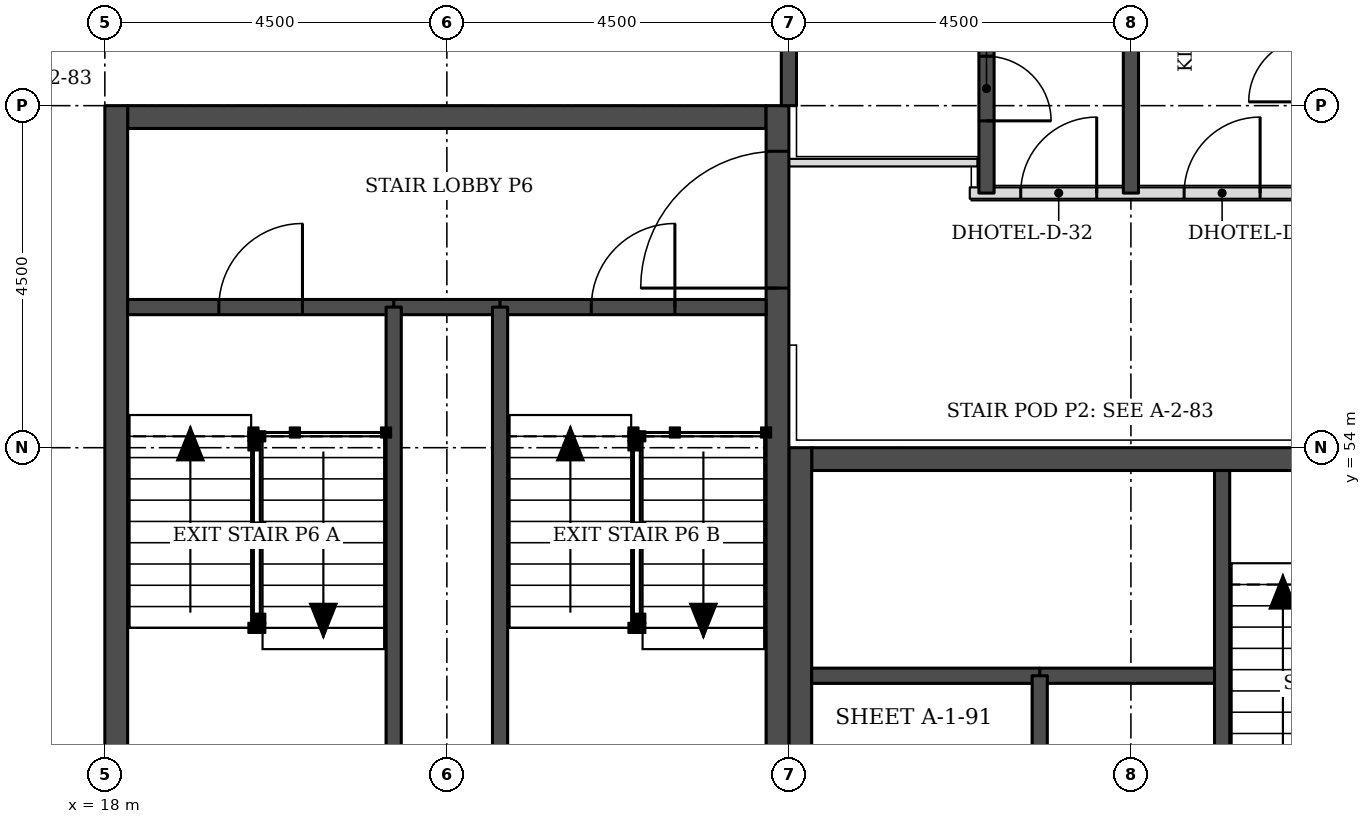
"""IFC4 building model, lengths in metres.
Left out: names, types, materials, properties, quantities, classifications, styles, units other than length and angle.
Written with IfcOpenShell. Run it as: python <this file> out.ifc"""

import sys

from ifc_helpers import new_model, si_unit, direction, frame, frame_2d, origin, place, context, subcontext, project, spatial, rectangle, extrude, element, fill, save


model = new_model("IFC4")
c1 = context("Model", 3, precision=1e-05, world=origin(), true_north=direction((0.0, 1.0)))
c2 = subcontext(c1, "Body", "Model", "MODEL_VIEW")
j1 = project(units=[si_unit("LENGTHUNIT", "METRE"), si_unit("PLANEANGLEUNIT", "RADIAN")], contexts=[c1])
p1 = place(None, origin())
s1 = spatial("IfcSite", under=j1, at=p1, CompositionType="ELEMENT")
p2 = place(p1, origin())
s2 = spatial("IfcBuilding", under=s1, at=p2, CompositionType="ELEMENT")
p3 = place(p2, frame((0.0, 0.0, 59.4)))
s3 = spatial("IfcBuildingStorey", under=s2, at=p3, CompositionType="ELEMENT", Elevation=59.4)
p4 = place(p3, frame((27.3, 53.85, 0.0), z_axis=(0.0, 0.0, 1.0), x_axis=(1.0, 0.0, 0.0)))
e1 = element("IfcWall", 1, at=p4, inside=s3, PredefinedType="SHEAR", context=c2, shape_type="SweptSolid", body=[
    extrude(rectangle(XDim=8.4, YDim=0.3, at=frame_2d((4.2, 0.0))), origin(), (0.0, 0.0, 1.0), 3.3),
])
p5 = place(p4, frame((6.4, 0.0, 0.0)))
e2 = element("IfcOpeningElement", 2, at=p5, cuts=e1, PredefinedType="OPENING", context=c2, shape_type="SweptSolid", body=[
    extrude(rectangle(XDim=1.1, YDim=2.1, at=frame_2d((0.55, 1.05))), frame((0.0, 0.16, 0.0), z_axis=(0.0, -1.0, 0.0), x_axis=(1.0, 0.0, 0.0)), (0.0, 0.0, 1.0), 0.32),
])
p6 = place(p3, frame((27.15, 45.0, 0.0), z_axis=(0.0, 0.0, 1.0), x_axis=(0.0, 1.0, 0.0)))
e3 = element("IfcWall", 3, at=p6, inside=s3, PredefinedType="SHEAR", context=c2, shape_type="SweptSolid", body=[
    extrude(rectangle(XDim=9.0, YDim=0.3, at=frame_2d((4.5, 0.0))), origin(), (0.0, 0.0, 1.0), 3.3),
])
p7 = place(p6, frame((0.4, 0.0, 0.0)))
e4 = element("IfcOpeningElement", 4, at=p7, cuts=e3, PredefinedType="OPENING", context=c2, shape_type="SweptSolid", body=[
    extrude(rectangle(XDim=1.1, YDim=2.1, at=frame_2d((0.55, 1.05))), frame((0.0, 0.16, 0.0), z_axis=(0.0, -1.0, 0.0), x_axis=(1.0, 0.0, 0.0)), (0.0, 0.0, 1.0), 0.32),
])
p8 = place(p3, frame((18.3, 58.35, 0.0), z_axis=(0.0, 0.0, 1.0), x_axis=(1.0, 0.0, 0.0)))
e5 = element("IfcWall", 5, at=p8, inside=s3, PredefinedType="SHEAR", context=c2, shape_type="SweptSolid", body=[
    extrude(rectangle(XDim=8.4, YDim=0.3, at=frame_2d((4.2, 0.0))), origin(), (0.0, 0.0, 1.0), 3.3),
])
p9 = place(p3, frame((18.15, 49.5, 0.0), z_axis=(0.0, 0.0, 1.0), x_axis=(0.0, 1.0, 0.0)))
e6 = element("IfcWall", 6, at=p9, inside=s3, PredefinedType="SHEAR", context=c2, shape_type="SweptSolid", body=[
    extrude(rectangle(XDim=9.0, YDim=0.3, at=frame_2d((4.5, 0.0))), origin(), (0.0, 0.0, 1.0), 3.3),
])
p10 = place(p3, frame((26.85, 49.5, 0.0), z_axis=(0.0, 0.0, 1.0), x_axis=(0.0, 1.0, 0.0)))
e7 = element("IfcWall", 7, at=p10, inside=s3, PredefinedType="SHEAR", context=c2, shape_type="SweptSolid", body=[
    extrude(rectangle(XDim=9.0, YDim=0.3, at=frame_2d((4.5, 0.0))), origin(), (0.0, 0.0, 1.0), 3.3),
])
p11 = place(p10, frame((6.6, 0.0, 0.0)))
e8 = element("IfcOpeningElement", 8, at=p11, cuts=e7, PredefinedType="OPENING", context=c2, shape_type="SweptSolid", body=[
    extrude(rectangle(XDim=1.8, YDim=2.1, at=frame_2d((0.9, 1.05))), frame((0.0, 0.16, 0.0), z_axis=(0.0, -1.0, 0.0), x_axis=(1.0, 0.0, 0.0)), (0.0, 0.0, 1.0), 0.32),
])
p12 = place(p3, frame((17.73, 63.826, 0.0), z_axis=(0.0, 0.0, 1.0), x_axis=(-0.707106781187, -0.707106781187, 0.0)))
e9 = element("IfcWall", 9, at=p12, inside=s3, PredefinedType="STANDARD", context=c2, shape_type="SweptSolid", body=[
    extrude(rectangle(XDim=7.151, YDim=0.35, at=frame_2d((3.576, 0.0))), origin(), (0.0, 0.0, 1.0), 3.055),
])
p13 = place(p12, frame((1.926, 0.0, 0.8)))
e10 = element("IfcOpeningElement", 10, at=p13, cuts=e9, PredefinedType="OPENING", context=c2, shape_type="SweptSolid", body=[
    extrude(rectangle(XDim=3.3, YDim=1.5, at=frame_2d((1.65, 0.75))), frame((0.0, 0.185, 0.0), z_axis=(0.0, -1.0, 0.0), x_axis=(1.0, 0.0, 0.0)), (0.0, 0.0, 1.0), 0.37),
])
p14 = place(p3, frame((29.38, 57.35, 0.0), z_axis=(0.0, 0.0, 1.0), x_axis=(1.0, 0.0, 0.0)))
e11 = element("IfcWall", 11, at=p14, inside=s3, PredefinedType="PARTITIONING", context=c2, shape_type="SweptSolid", body=[
    extrude(rectangle(XDim=13.62, YDim=0.15, at=frame_2d((6.81, 0.0))), origin(), (0.0, 0.0, 1.0), 3.08),
])
p15 = place(p14, frame((2.82, 0.0, 0.0)))
e12 = element("IfcOpeningElement", 12, at=p15, cuts=e11, PredefinedType="OPENING", context=c2, shape_type="SweptSolid", body=[
    extrude(rectangle(XDim=1.0, YDim=2.1, at=frame_2d((0.5, 1.05))), frame((0.0, 0.085, 0.0), z_axis=(0.0, -1.0, 0.0), x_axis=(1.0, 0.0, 0.0)), (0.0, 0.0, 1.0), 0.17),
])
p16 = place(p14, frame((0.67, 0.0, 0.0)))
e13 = element("IfcOpeningElement", 13, at=p16, cuts=e11, PredefinedType="OPENING", context=c2, shape_type="SweptSolid", body=[
    extrude(rectangle(XDim=1.0, YDim=2.1, at=frame_2d((0.5, 1.05))), frame((0.0, 0.085, 0.0), z_axis=(0.0, -1.0, 0.0), x_axis=(1.0, 0.0, 0.0)), (0.0, 0.0, 1.0), 0.17),
])
p17 = place(p14, frame((9.67, 0.0, 0.0)))
e14 = element("IfcOpeningElement", 14, at=p17, cuts=e11, PredefinedType="OPENING", context=c2, shape_type="SweptSolid", body=[
    extrude(rectangle(XDim=0.9, YDim=2.1, at=frame_2d((0.45, 1.05))), frame((0.0, 0.085, 0.0), z_axis=(0.0, -1.0, 0.0), x_axis=(1.0, 0.0, 0.0)), (0.0, 0.0, 1.0), 0.17),
])
p18 = place(p3, frame((27.0, 58.5, 0.0), z_axis=(0.0, 0.0, 1.0), x_axis=(0.0, 1.0, 0.0)))
e15 = element("IfcWall", 15, at=p18, inside=s3, PredefinedType="SOLIDWALL", context=c2, shape_type="SweptSolid", body=[
    extrude(rectangle(XDim=3.9, YDim=0.2, at=frame_2d((1.95, 0.0))), origin(), (0.0, 0.0, 1.0), 3.08),
])
p19 = place(p3, frame((29.6, 57.35, 0.0), z_axis=(0.0, 0.0, 1.0), x_axis=(0.0, 1.0, 0.0)))
e16 = element("IfcWall", 16, at=p19, inside=s3, PredefinedType="SOLIDWALL", context=c2, shape_type="SweptSolid", body=[
    extrude(rectangle(XDim=2.75, YDim=0.2, at=frame_2d((1.375, 0.0))), origin(), (0.0, 0.0, 1.0), 3.08),
])
p20 = place(p19, frame((0.95, 0.0, 0.0)))
e17 = element("IfcOpeningElement", 17, at=p20, cuts=e16, PredefinedType="OPENING", context=c2, shape_type="SweptSolid", body=[
    extrude(rectangle(XDim=0.85, YDim=2.1, at=frame_2d((0.425, 1.05))), frame((0.0, 0.11, 0.0), z_axis=(0.0, -1.0, 0.0), x_axis=(1.0, 0.0, 0.0)), (0.0, 0.0, 1.0), 0.22),
])
p21 = place(p3, frame((31.5, 57.35, 0.0), z_axis=(0.0, 0.0, 1.0), x_axis=(0.0, 1.0, 0.0)))
e18 = element("IfcWall", 18, at=p21, inside=s3, PredefinedType="SOLIDWALL", context=c2, shape_type="SweptSolid", body=[
    extrude(rectangle(XDim=5.05, YDim=0.2, at=frame_2d((2.525, 0.0))), origin(), (0.0, 0.0, 1.0), 3.08),
])
p22 = place(p3, frame((27.0, 57.75, 0.0), z_axis=(0.0, 0.0, 1.0), x_axis=(1.0, 0.0, 0.0)))
e19 = element("IfcWall", 19, at=p22, inside=s3, PredefinedType="PARTITIONING", context=c2, shape_type="SweptSolid", body=[
    extrude(rectangle(XDim=2.48, YDim=0.1, at=frame_2d((1.24, 0.0))), origin(), (0.0, 0.0, 1.0), 3.08),
])
p23 = place(p3, frame((30.3, 51.0, 0.0), z_axis=(0.0, 0.0, 1.0), x_axis=(1.0, 0.0, 0.0)))
e20 = element("IfcWall", 20, at=p23, inside=s3, PredefinedType="SOLIDWALL", context=c2, shape_type="SweptSolid", body=[
    extrude(rectangle(XDim=2.4, YDim=0.2, at=frame_2d((1.2, 0.0))), origin(), (0.0, 0.0, 1.0), 3.3),
])
p24 = place(p3, frame((27.3, 51.0, 0.0), z_axis=(0.0, 0.0, 1.0), x_axis=(1.0, 0.0, 0.0)))
e21 = element("IfcWall", 21, at=p24, inside=s3, PredefinedType="SOLIDWALL", context=c2, shape_type="SweptSolid", body=[
    extrude(rectangle(XDim=3.0, YDim=0.2, at=frame_2d((1.5, 0.0))), origin(), (0.0, 0.0, 1.0), 3.08),
])
for number, where, z_axis, x_axis in (
    (22, (30.3, 45.3, 0.0), (0.0, 0.0, 1.0), (0.0, 1.0, 0.0)),
    (23, (32.7, 48.0, 0.0), (0.0, 0.0, 1.0), (0.0, 1.0, 0.0)),
):
    element("IfcWall", number, at=place(p3, frame(where, z_axis=z_axis, x_axis=x_axis)), inside=s3, PredefinedType="SOLIDWALL", context=c2, shape_type="SweptSolid", body=[
        extrude(rectangle(XDim=5.7, YDim=0.2, at=frame_2d((2.85, 0.0))), origin(), (0.0, 0.0, 1.0), 3.08),
    ])
p25 = place(p3, frame((21.8, 55.85, 0.0), z_axis=(0.0, 0.0, 1.0), x_axis=(1.0, 0.0, 0.0)))
e24 = element("IfcWall", 24, at=p25, inside=s3, PredefinedType="SOLIDWALL", context=c2, shape_type="SweptSolid", body=[
    extrude(rectangle(XDim=1.4, YDim=0.2, at=frame_2d((0.7, 0.0))), origin(), (0.0, 0.0, 1.0), 3.08),
])
p26 = place(p3, frame((18.3, 55.85, 0.0), z_axis=(0.0, 0.0, 1.0), x_axis=(1.0, 0.0, 0.0)))
e25 = element("IfcWall", 25, at=p26, inside=s3, PredefinedType="SOLIDWALL", context=c2, shape_type="SweptSolid", body=[
    extrude(rectangle(XDim=3.5, YDim=0.2, at=frame_2d((1.75, 0.0))), origin(), (0.0, 0.0, 1.0), 3.08),
])
p27 = place(p26, frame((1.2, 0.0, 0.0)))
e26 = element("IfcOpeningElement", 26, at=p27, cuts=e25, PredefinedType="OPENING", context=c2, shape_type="SweptSolid", body=[
    extrude(rectangle(XDim=1.1, YDim=2.1, at=frame_2d((0.55, 1.05))), frame((0.0, 0.11, 0.0), z_axis=(0.0, -1.0, 0.0), x_axis=(1.0, 0.0, 0.0)), (0.0, 0.0, 1.0), 0.22),
])
p28 = place(p3, frame((23.2, 55.85, 0.0), z_axis=(0.0, 0.0, 1.0), x_axis=(1.0, 0.0, 0.0)))
e27 = element("IfcWall", 27, at=p28, inside=s3, PredefinedType="SOLIDWALL", context=c2, shape_type="SweptSolid", body=[
    extrude(rectangle(XDim=3.5, YDim=0.2, at=frame_2d((1.75, 0.0))), origin(), (0.0, 0.0, 1.0), 3.08),
])
p29 = place(p28, frame((1.2, 0.0, 0.0)))
e28 = element("IfcOpeningElement", 28, at=p29, cuts=e27, PredefinedType="OPENING", context=c2, shape_type="SweptSolid", body=[
    extrude(rectangle(XDim=1.1, YDim=2.1, at=frame_2d((0.55, 1.05))), frame((0.0, 0.11, 0.0), z_axis=(0.0, -1.0, 0.0), x_axis=(1.0, 0.0, 0.0)), (0.0, 0.0, 1.0), 0.22),
])
for number, where, z_axis, x_axis in (
    (29, (21.8, 49.8, 0.0), (0.0, 0.0, 1.0), (0.0, 1.0, 0.0)),
    (30, (23.2, 49.8, 0.0), (0.0, 0.0, 1.0), (0.0, 1.0, 0.0)),
):
    element("IfcWall", number, at=place(p3, frame(where, z_axis=z_axis, x_axis=x_axis)), inside=s3, PredefinedType="SOLIDWALL", context=c2, shape_type="SweptSolid", body=[
        extrude(rectangle(XDim=6.05, YDim=0.2, at=frame_2d((3.025, 0.0))), origin(), (0.0, 0.0, 1.0), 3.08),
    ])
p30 = place(p15, origin())
e31 = element("IfcDoor", 31, at=p30, inside=s3, OperationType="SINGLE_SWING_RIGHT", PredefinedType="DOOR", context=c2, shape_type="SweptSolid", body=[
    extrude(rectangle(XDim=1.0, YDim=2.1, at=frame_2d((0.5, 1.05))), frame((0.0, 0.025, 0.0), z_axis=(0.0, -1.0, 0.0), x_axis=(1.0, 0.0, 0.0)), (0.0, 0.0, 1.0), 0.05),
])
fill(e12, e31)
p31 = place(p16, origin())
e32 = element("IfcDoor", 32, at=p31, inside=s3, OperationType="SINGLE_SWING_RIGHT", PredefinedType="DOOR", context=c2, shape_type="SweptSolid", body=[
    extrude(rectangle(XDim=1.0, YDim=2.1, at=frame_2d((0.5, 1.05))), frame((0.0, 0.025, 0.0), z_axis=(0.0, -1.0, 0.0), x_axis=(1.0, 0.0, 0.0)), (0.0, 0.0, 1.0), 0.05),
])
fill(e13, e32)
p32 = place(p20, frame((0.85, 0.0, 0.0), z_axis=(0.0, 0.0, 1.0), x_axis=(-1.0, 0.0, 0.0)))
e33 = element("IfcDoor", 33, at=p32, inside=s3, OperationType="SINGLE_SWING_RIGHT", PredefinedType="DOOR", context=c2, shape_type="SweptSolid", body=[
    extrude(rectangle(XDim=0.85, YDim=2.1, at=frame_2d((0.425, 1.05))), frame((0.0, 0.025, 0.0), z_axis=(0.0, -1.0, 0.0), x_axis=(1.0, 0.0, 0.0)), (0.0, 0.0, 1.0), 0.05),
])
fill(e17, e33)
p33 = place(p27, origin())
e34 = element("IfcDoor", 34, at=p33, inside=s3, OperationType="SINGLE_SWING_RIGHT", PredefinedType="DOOR", context=c2, shape_type="SweptSolid", body=[
    extrude(rectangle(XDim=1.1, YDim=2.1, at=frame_2d((0.55, 1.05))), frame((0.0, 0.025, 0.0), z_axis=(0.0, -1.0, 0.0), x_axis=(1.0, 0.0, 0.0)), (0.0, 0.0, 1.0), 0.05),
])
fill(e26, e34)
p34 = place(p29, origin())
e35 = element("IfcDoor", 35, at=p34, inside=s3, OperationType="SINGLE_SWING_RIGHT", PredefinedType="DOOR", context=c2, shape_type="SweptSolid", body=[
    extrude(rectangle(XDim=1.1, YDim=2.1, at=frame_2d((0.55, 1.05))), frame((0.0, 0.025, 0.0), z_axis=(0.0, -1.0, 0.0), x_axis=(1.0, 0.0, 0.0)), (0.0, 0.0, 1.0), 0.05),
])
fill(e28, e35)
p35 = place(p11, origin())
e36 = element("IfcDoor", 36, at=p35, inside=s3, OperationType="SINGLE_SWING_LEFT", PredefinedType="DOOR", context=c2, shape_type="SweptSolid", body=[
    extrude(rectangle(XDim=1.8, YDim=2.1, at=frame_2d((0.9, 1.05))), frame((0.0, 0.025, 0.0), z_axis=(0.0, -1.0, 0.0), x_axis=(1.0, 0.0, 0.0)), (0.0, 0.0, 1.0), 0.05),
])
fill(e8, e36)
save(model, sys.argv[1])
